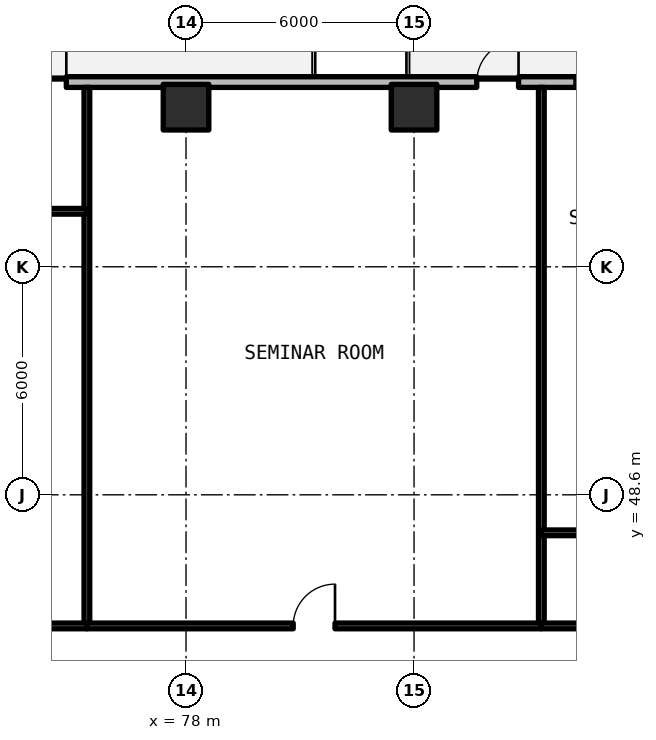
"""IFC4 building model, lengths in metres.
Left out: names, types, materials, properties, quantities, classifications, styles, units other than length and angle.
Written with IfcOpenShell. Run it as: python <this file> out.ifc"""

import sys

from ifc_helpers import new_model, si_unit, direction, frame, frame_2d, origin, origin_2d, place, context, subcontext, project, spatial, rectangle, extrude, element, fill, save


model = new_model("IFC4")
c1 = context("Model", 3, precision=1e-05, world=origin(), true_north=direction((0.0, 1.0)))
c2 = subcontext(c1, "Body", "Model", "MODEL_VIEW")
j1 = project(units=[si_unit("LENGTHUNIT", "METRE"), si_unit("PLANEANGLEUNIT", "RADIAN")], contexts=[c1])
p1 = place(None, origin())
s1 = spatial("IfcSite", under=j1, at=p1, CompositionType="ELEMENT")
p2 = place(p1, origin())
s2 = spatial("IfcBuilding", under=s1, at=p2, CompositionType="ELEMENT")
p3 = place(p2, frame((0.0, 0.0, 48.84)))
s3 = spatial("IfcBuildingStorey", under=s2, at=p3, CompositionType="ELEMENT", Elevation=48.84)
for number, where, z_axis, x_axis in (
    (1, (78.0, 58.8, 0.0), (0.0, 0.0, 1.0), (1.0, 0.0, 0.0)),
    (2, (84.0, 58.8, 0.0), (0.0, 0.0, 1.0), (1.0, 0.0, 0.0)),
):
    element("IfcColumn", number, at=place(p3, frame(where, z_axis=z_axis, x_axis=x_axis)), inside=s3, PredefinedType="COLUMN", context=c2, shape_type="SweptSolid", body=[
        extrude(rectangle(XDim=1.2, YDim=1.2, at=origin_2d()), origin(), (0.0, 0.0, 1.0), 3.3),
    ])
p4 = place(p3, frame((96.542, 59.46, 0.0), z_axis=(0.0, 0.0, 1.0), x_axis=(-1.0, 0.0, 0.0)))
e3 = element("IfcWall", 3, at=p4, inside=s3, PredefinedType="SOLIDWALL", context=c2, shape_type="SweptSolid", body=[
    extrude(rectangle(XDim=44.402, YDim=0.28, at=frame_2d((22.201, 0.0))), origin(), (0.0, 0.0, 1.0), 3.08),
])
p5 = place(p4, frame((32.292, 0.0, 0.0)))
e4 = element("IfcOpeningElement", 4, at=p5, cuts=e3, PredefinedType="OPENING", context=c2, shape_type="SweptSolid", body=[
    extrude(rectangle(XDim=1.1, YDim=2.15, at=frame_2d((0.55, 1.075))), frame((0.0, 0.15, 0.0), z_axis=(0.0, -1.0, 0.0), x_axis=(1.0, 0.0, 0.0)), (0.0, 0.0, 1.0), 0.3),
])
p6 = place(p4, frame((21.692, 0.0, 0.0)))
e5 = element("IfcOpeningElement", 5, at=p6, cuts=e3, PredefinedType="OPENING", context=c2, shape_type="SweptSolid", body=[
    extrude(rectangle(XDim=1.1, YDim=2.15, at=frame_2d((0.55, 1.075))), frame((0.0, 0.15, 0.0), z_axis=(0.0, -1.0, 0.0), x_axis=(1.0, 0.0, 0.0)), (0.0, 0.0, 1.0), 0.3),
])
p7 = place(p4, frame((9.792, 0.0, 0.0)))
e6 = element("IfcOpeningElement", 6, at=p7, cuts=e3, PredefinedType="OPENING", context=c2, shape_type="SweptSolid", body=[
    extrude(rectangle(XDim=1.1, YDim=2.15, at=frame_2d((0.55, 1.075))), frame((0.0, 0.15, 0.0), z_axis=(0.0, -1.0, 0.0), x_axis=(1.0, 0.0, 0.0)), (0.0, 0.0, 1.0), 0.3),
])
p8 = place(p4, frame((39.455, 0.0, 0.78)))
e7 = element("IfcOpeningElement", 7, at=p8, cuts=e3, PredefinedType="OPENING", context=c2, shape_type="SweptSolid", body=[
    extrude(rectangle(XDim=2.2, YDim=1.66, at=frame_2d((1.1, 0.83))), frame((0.0, 0.15, 0.0), z_axis=(0.0, -1.0, 0.0), x_axis=(1.0, 0.0, 0.0)), (0.0, 0.0, 1.0), 0.3),
])
p9 = place(p4, frame((7.432, 0.0, 0.78)))
e8 = element("IfcOpeningElement", 8, at=p9, cuts=e3, PredefinedType="OPENING", context=c2, shape_type="SweptSolid", body=[
    extrude(rectangle(XDim=0.85, YDim=1.65, at=frame_2d((0.425, 0.825))), frame((0.0, 0.15, 0.0), z_axis=(0.0, -1.0, 0.0), x_axis=(1.0, 0.0, 0.0)), (0.0, 0.0, 1.0), 0.3),
])
p10 = place(p4, frame((1.292, 0.0, 0.78)))
e9 = element("IfcOpeningElement", 9, at=p10, cuts=e3, PredefinedType="OPENING", context=c2, shape_type="SweptSolid", body=[
    extrude(rectangle(XDim=2.2, YDim=1.66, at=frame_2d((1.1, 0.83))), frame((0.0, 0.15, 0.0), z_axis=(0.0, -1.0, 0.0), x_axis=(1.0, 0.0, 0.0)), (0.0, 0.0, 1.0), 0.3),
])
p11 = place(p3, frame((75.391, 45.15, 0.0), z_axis=(0.0, 0.0, 1.0), x_axis=(0.0, 1.0, 0.0)))
e10 = element("IfcWall", 10, at=p11, inside=s3, PredefinedType="SOLIDWALL", context=c2, shape_type="SweptSolid", body=[
    extrude(rectangle(XDim=14.17, YDim=0.15, at=frame_2d((7.085, 0.0))), origin(), (0.0, 0.0, 1.0), 2.35),
])
p12 = place(p3, frame((66.341, 56.06, 0.0), z_axis=(0.0, 0.0, 1.0), x_axis=(1.0, 0.0, 0.0)))
e11 = element("IfcWall", 11, at=p12, inside=s3, PredefinedType="PARTITIONING", context=c2, shape_type="SweptSolid", body=[
    extrude(rectangle(XDim=9.05, YDim=0.15, at=frame_2d((4.525, 0.0))), origin(), (0.0, 0.0, 1.0), 2.35),
])
p13 = place(p12, frame((5.315, 0.0, 0.0)))
e12 = element("IfcOpeningElement", 12, at=p13, cuts=e11, PredefinedType="OPENING", context=c2, shape_type="SweptSolid", body=[
    extrude(rectangle(XDim=0.85, YDim=2.1, at=frame_2d((0.425, 1.05))), frame((0.0, 0.085, 0.0), z_axis=(0.0, -1.0, 0.0), x_axis=(1.0, 0.0, 0.0)), (0.0, 0.0, 1.0), 0.17),
])
p14 = place(p3, frame((66.341, 45.15, 0.0), z_axis=(0.0, 0.0, 1.0), x_axis=(1.0, 0.0, 0.0)))
e13 = element("IfcWall", 13, at=p14, inside=s3, PredefinedType="SOLIDWALL", context=c2, shape_type="SweptSolid", body=[
    extrude(rectangle(XDim=9.05, YDim=0.15, at=frame_2d((4.525, 0.0))), origin(), (0.0, 0.0, 1.0), 2.35),
])
p15 = place(p14, frame((5.265, 0.0, 0.0)))
e14 = element("IfcOpeningElement", 14, at=p15, cuts=e13, PredefinedType="OPENING", context=c2, shape_type="SweptSolid", body=[
    extrude(rectangle(XDim=0.95, YDim=2.15, at=frame_2d((0.475, 1.075))), frame((0.0, 0.085, 0.0), z_axis=(0.0, -1.0, 0.0), x_axis=(1.0, 0.0, 0.0)), (0.0, 0.0, 1.0), 0.17),
])
p16 = place(p3, frame((87.35, 45.15, 0.0), z_axis=(0.0, 0.0, 1.0), x_axis=(0.0, 1.0, 0.0)))
e15 = element("IfcWall", 15, at=p16, inside=s3, PredefinedType="SOLIDWALL", context=c2, shape_type="SweptSolid", body=[
    extrude(rectangle(XDim=14.17, YDim=0.15, at=frame_2d((7.085, 0.0))), origin(), (0.0, 0.0, 1.0), 2.35),
])
p17 = place(p3, frame((75.391, 45.15, 0.0), z_axis=(0.0, 0.0, 1.0), x_axis=(1.0, 0.0, 0.0)))
e16 = element("IfcWall", 16, at=p17, inside=s3, PredefinedType="SOLIDWALL", context=c2, shape_type="SweptSolid", body=[
    extrude(rectangle(XDim=11.959, YDim=0.15, at=frame_2d((5.979, 0.0))), origin(), (0.0, 0.0, 1.0), 2.35),
])
p18 = place(p17, frame((5.429, 0.0, 0.0)))
e17 = element("IfcOpeningElement", 17, at=p18, cuts=e16, PredefinedType="OPENING", context=c2, shape_type="SweptSolid", body=[
    extrude(rectangle(XDim=1.1, YDim=2.15, at=frame_2d((0.55, 1.075))), frame((0.0, 0.085, 0.0), z_axis=(0.0, -1.0, 0.0), x_axis=(1.0, 0.0, 0.0)), (0.0, 0.0, 1.0), 0.17),
])
p19 = place(p3, frame((87.35, 47.6, 0.0), z_axis=(0.0, 0.0, 1.0), x_axis=(1.0, 0.0, 0.0)))
e18 = element("IfcWall", 18, at=p19, inside=s3, PredefinedType="PARTITIONING", context=c2, shape_type="SweptSolid", body=[
    extrude(rectangle(XDim=4.57, YDim=0.15, at=frame_2d((2.285, 0.0))), origin(), (0.0, 0.0, 1.0), 2.35),
])
p20 = place(p3, frame((87.35, 45.15, 0.0), z_axis=(0.0, 0.0, 1.0), x_axis=(1.0, 0.0, 0.0)))
e19 = element("IfcWall", 19, at=p20, inside=s3, PredefinedType="SOLIDWALL", context=c2, shape_type="SweptSolid", body=[
    extrude(rectangle(XDim=9.05, YDim=0.15, at=frame_2d((4.525, 0.0))), origin(), (0.0, 0.0, 1.0), 2.35),
])
p21 = place(p20, frame((6.375, 0.0, 0.0)))
e20 = element("IfcOpeningElement", 20, at=p21, cuts=e19, PredefinedType="OPENING", context=c2, shape_type="SweptSolid", body=[
    extrude(rectangle(XDim=0.95, YDim=2.15, at=frame_2d((0.475, 1.075))), frame((0.0, 0.085, 0.0), z_axis=(0.0, -1.0, 0.0), x_axis=(1.0, 0.0, 0.0)), (0.0, 0.0, 1.0), 0.17),
])
p22 = place(p6, frame((1.1, 0.0, 0.0), z_axis=(0.0, 0.0, 1.0), x_axis=(-1.0, 0.0, 0.0)))
e21 = element("IfcDoor", 21, at=p22, inside=s3, OperationType="SINGLE_SWING_LEFT", PredefinedType="DOOR", context=c2, shape_type="SweptSolid", body=[
    extrude(rectangle(XDim=1.1, YDim=2.15, at=frame_2d((0.55, 1.075))), frame((0.0, 0.025, 0.0), z_axis=(0.0, -1.0, 0.0), x_axis=(1.0, 0.0, 0.0)), (0.0, 0.0, 1.0), 0.05),
])
fill(e5, e21)
p23 = place(p7, frame((1.1, 0.0, 0.0), z_axis=(0.0, 0.0, 1.0), x_axis=(-1.0, 0.0, 0.0)))
e22 = element("IfcDoor", 22, at=p23, inside=s3, OperationType="SINGLE_SWING_RIGHT", PredefinedType="DOOR", context=c2, shape_type="SweptSolid", body=[
    extrude(rectangle(XDim=1.1, YDim=2.15, at=frame_2d((0.55, 1.075))), frame((0.0, 0.025, 0.0), z_axis=(0.0, -1.0, 0.0), x_axis=(1.0, 0.0, 0.0)), (0.0, 0.0, 1.0), 0.05),
])
fill(e6, e22)
p24 = place(p9, origin())
e23 = element("IfcWindow", 23, at=p24, inside=s3, PartitioningType="SINGLE_PANEL", PredefinedType="WINDOW", context=c2, shape_type="SweptSolid", body=[
    extrude(rectangle(XDim=0.85, YDim=1.65, at=frame_2d((0.425, 0.825))), frame((0.0, 0.03, 0.0), z_axis=(0.0, -1.0, 0.0), x_axis=(1.0, 0.0, 0.0)), (0.0, 0.0, 1.0), 0.06),
])
fill(e8, e23)
p25 = place(p18, origin())
e24 = element("IfcDoor", 24, at=p25, inside=s3, OperationType="SINGLE_SWING_RIGHT", PredefinedType="DOOR", context=c2, shape_type="SweptSolid", body=[
    extrude(rectangle(XDim=1.1, YDim=2.15, at=frame_2d((0.55, 1.075))), frame((0.0, 0.025, 0.0), z_axis=(0.0, -1.0, 0.0), x_axis=(1.0, 0.0, 0.0)), (0.0, 0.0, 1.0), 0.05),
])
fill(e17, e24)
save(model, sys.argv[1])
